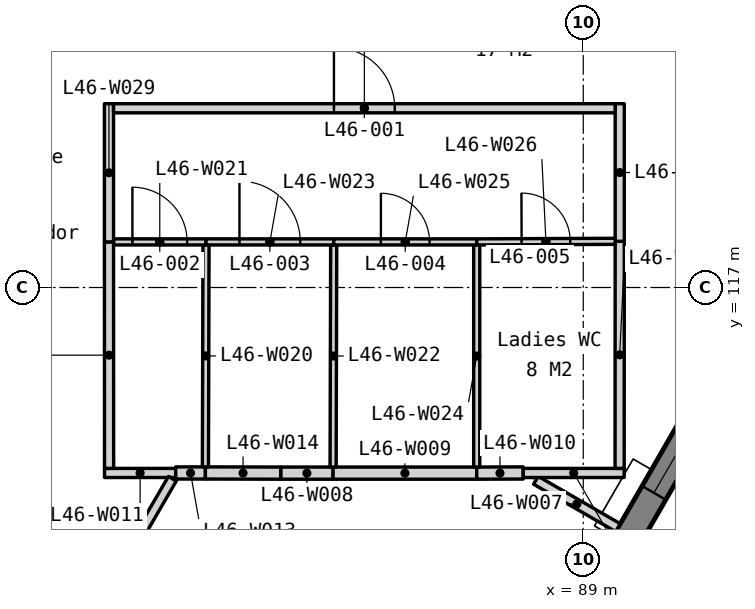
"""IFC4 building model, lengths in metres.
Left out: names, types, materials, properties, quantities, classifications, styles, units other than length and angle.
Written with IfcOpenShell. Run it as: python <this file> out.ifc"""

import sys

from ifc_helpers import new_model, si_unit, direction, frame, frame_2d, origin, place, context, subcontext, project, spatial, polyline, rectangle, outline, extrude, element, fill, save


model = new_model("IFC4")
c1 = context("Model", 3, precision=1e-05, world=origin(), true_north=direction((0.0, 1.0)))
c2 = subcontext(c1, "Body", "Model", "MODEL_VIEW")
j1 = project(units=[si_unit("LENGTHUNIT", "METRE"), si_unit("PLANEANGLEUNIT", "RADIAN")], contexts=[c1])
p1 = place(None, origin())
s1 = spatial("IfcSite", under=j1, at=p1, CompositionType="ELEMENT")
p2 = place(p1, origin())
s2 = spatial("IfcBuilding", under=s1, at=p2, CompositionType="ELEMENT")
p3 = place(p2, frame((0.0, 0.0, 184.1)))
s3 = spatial("IfcBuildingStorey", under=s2, at=p3, CompositionType="ELEMENT", Elevation=184.1)
p4 = place(p3, frame((81.505, 98.627, -0.15), z_axis=(0.0, 0.0, 1.0), x_axis=(0.500002199942, 0.866024133644, 0.0)))
e1 = element("IfcWall", 1, at=p4, inside=s3, PredefinedType="SOLIDWALL", context=c2, shape_type="SweptSolid", body=[
    extrude(outline(polyline([(38.729, 0.0), (38.729, 3.9), (0.0, 3.9), (0.0, 0.0), (38.729, 0.0)])), frame((0.0, 0.225, 0.0), z_axis=(0.0, -1.0, 0.0), x_axis=(1.0, 0.0, 0.0)), (0.0, 0.0, 1.0), 0.45),
])
p5 = place(p4, frame((0.776, 0.0, 0.95)))
e2 = element("IfcOpeningElement", 2, at=p5, cuts=e1, PredefinedType="OPENING", context=c2, shape_type="SweptSolid", body=[
    extrude(rectangle(XDim=1.2, YDim=2.2, at=frame_2d((0.6, 1.1))), frame((0.0, 0.235, 0.0), z_axis=(0.0, -1.0, 0.0), x_axis=(1.0, 0.0, 0.0)), (0.0, 0.0, 1.0), 0.47),
])
p6 = place(p4, frame((7.632, 0.0, 0.95)))
e3 = element("IfcOpeningElement", 3, at=p6, cuts=e1, PredefinedType="OPENING", context=c2, shape_type="SweptSolid", body=[
    extrude(rectangle(XDim=1.8, YDim=2.2, at=frame_2d((0.9, 1.1))), frame((0.0, 0.235, 0.0), z_axis=(0.0, -1.0, 0.0), x_axis=(1.0, 0.0, 0.0)), (0.0, 0.0, 1.0), 0.47),
])
p7 = place(p4, frame((9.932, 0.0, 0.95)))
e4 = element("IfcOpeningElement", 4, at=p7, cuts=e1, PredefinedType="OPENING", context=c2, shape_type="SweptSolid", body=[
    extrude(rectangle(XDim=1.8, YDim=2.2, at=frame_2d((0.9, 1.1))), frame((0.0, 0.235, 0.0), z_axis=(0.0, -1.0, 0.0), x_axis=(1.0, 0.0, 0.0)), (0.0, 0.0, 1.0), 0.47),
])
p8 = place(p4, frame((17.315, 0.0, 0.95)))
e5 = element("IfcOpeningElement", 5, at=p8, cuts=e1, PredefinedType="OPENING", context=c2, shape_type="SweptSolid", body=[
    extrude(rectangle(XDim=1.8, YDim=2.2, at=frame_2d((0.9, 1.1))), frame((0.0, 0.235, 0.0), z_axis=(0.0, -1.0, 0.0), x_axis=(1.0, 0.0, 0.0)), (0.0, 0.0, 1.0), 0.47),
])
p9 = place(p4, frame((19.615, 0.0, 0.95)))
e6 = element("IfcOpeningElement", 6, at=p9, cuts=e1, PredefinedType="OPENING", context=c2, shape_type="SweptSolid", body=[
    extrude(rectangle(XDim=1.8, YDim=2.2, at=frame_2d((0.9, 1.1))), frame((0.0, 0.235, 0.0), z_axis=(0.0, -1.0, 0.0), x_axis=(1.0, 0.0, 0.0)), (0.0, 0.0, 1.0), 0.47),
])
p10 = place(p4, frame((26.997, 0.0, 0.95)))
e7 = element("IfcOpeningElement", 7, at=p10, cuts=e1, PredefinedType="OPENING", context=c2, shape_type="SweptSolid", body=[
    extrude(rectangle(XDim=1.8, YDim=2.2, at=frame_2d((0.9, 1.1))), frame((0.0, 0.235, 0.0), z_axis=(0.0, -1.0, 0.0), x_axis=(1.0, 0.0, 0.0)), (0.0, 0.0, 1.0), 0.47),
])
p11 = place(p4, frame((29.297, 0.0, 0.95)))
e8 = element("IfcOpeningElement", 8, at=p11, cuts=e1, PredefinedType="OPENING", context=c2, shape_type="SweptSolid", body=[
    extrude(rectangle(XDim=1.8, YDim=2.2, at=frame_2d((0.9, 1.1))), frame((0.0, 0.235, 0.0), z_axis=(0.0, -1.0, 0.0), x_axis=(1.0, 0.0, 0.0)), (0.0, 0.0, 1.0), 0.47),
])
p12 = place(p4, frame((36.753, 0.0, 0.95)))
e9 = element("IfcOpeningElement", 9, at=p12, cuts=e1, PredefinedType="OPENING", context=c2, shape_type="SweptSolid", body=[
    extrude(rectangle(XDim=1.2, YDim=2.2, at=frame_2d((0.6, 1.1))), frame((0.0, 0.235, 0.0), z_axis=(0.0, -1.0, 0.0), x_axis=(1.0, 0.0, 0.0)), (0.0, 0.0, 1.0), 0.47),
])
p13 = place(p3, frame((88.221, 113.83, 0.0), z_axis=(0.0, 0.0, 1.0), x_axis=(0.865997745606, -0.500047902311, 0.0)))
e10 = element("IfcWall", 10, at=p13, inside=s3, PredefinedType="PARTITIONING", context=c2, shape_type="SweptSolid", body=[
    extrude(rectangle(XDim=1.558, YDim=0.15, at=frame_2d((0.779, 0.0))), origin(), (0.0, 0.0, 1.0), 3.75),
])
p14 = place(p3, frame((84.024, 113.947, 0.0), z_axis=(0.0, 0.0, 1.0), x_axis=(1.0, 0.0, 0.0)))
e11 = element("IfcWall", 11, at=p14, inside=s3, PredefinedType="PARTITIONING", context=c2, shape_type="SweptSolid", body=[
    extrude(rectangle(XDim=0.862, YDim=0.2, at=frame_2d((0.431, 0.0))), origin(), (0.0, 0.0, 1.0), 3.75),
])
p15 = place(p3, frame((84.886, 113.947, 0.0), z_axis=(0.0, 0.0, 1.0), x_axis=(1.0, 0.0, 0.0)))
e12 = element("IfcWall", 12, at=p15, inside=s3, PredefinedType="PARTITIONING", context=c2, shape_type="SweptSolid", body=[
    extrude(rectangle(XDim=2.362, YDim=0.2, at=frame_2d((1.181, 0.0))), origin(), (0.0, 0.0, 1.0), 3.75),
])
p16 = place(p3, frame((87.248, 113.947, 0.0), z_axis=(0.0, 0.0, 1.0), x_axis=(0.9999926602, 0.003831389503, 0.0)))
e13 = element("IfcWall", 13, at=p16, inside=s3, PredefinedType="PARTITIONING", context=c2, shape_type="SweptSolid", body=[
    extrude(rectangle(XDim=0.765, YDim=0.2, at=frame_2d((0.382, 0.0))), origin(), (0.0, 0.0, 1.0), 3.75),
])
p17 = place(p3, frame((81.127, 113.95, 0.0), z_axis=(0.0, 0.0, 1.0), x_axis=(1.0, 0.0, 0.0)))
e14 = element("IfcWall", 14, at=p17, inside=s3, PredefinedType="PARTITIONING", context=c2, shape_type="SweptSolid", body=[
    extrude(rectangle(XDim=1.17, YDim=0.15, at=frame_2d((0.585, 0.0))), origin(), (0.0, 0.0, 1.0), 3.75),
])
p18 = place(p3, frame((80.352, 110.6, 0.0), z_axis=(0.0, 0.0, 1.0), x_axis=(0.502155861577, 0.864777133534, 0.0)))
e15 = element("IfcWall", 15, at=p18, inside=s3, PredefinedType="PARTITIONING", context=c2, shape_type="SweptSolid", body=[
    extrude(rectangle(XDim=3.764, YDim=0.15, at=frame_2d((1.882, 0.0))), origin(), (0.0, 0.0, 1.0), 3.75),
])
p19 = place(p18, frame((1.382, 0.0, 0.0)))
e16 = element("IfcOpeningElement", 16, at=p19, cuts=e15, PredefinedType="OPENING", context=c2, shape_type="SweptSolid", body=[
    extrude(rectangle(XDim=1.0, YDim=2.1, at=frame_2d((0.5, 1.05))), frame((0.0, 0.085, 0.0), z_axis=(0.0, -1.0, 0.0), x_axis=(1.0, 0.0, 0.0)), (0.0, 0.0, 1.0), 0.17),
])
p20 = place(p3, frame((82.297, 113.95, 0.0), z_axis=(0.0, 0.0, 1.0), x_axis=(1.0, 0.0, 0.0)))
e17 = element("IfcWall", 17, at=p20, inside=s3, PredefinedType="PARTITIONING", context=c2, shape_type="SweptSolid", body=[
    extrude(rectangle(XDim=0.489, YDim=0.2, at=frame_2d((0.244, 0.0))), origin(), (0.0, 0.0, 1.0), 3.75),
])
p21 = place(p3, frame((82.786, 113.95, 0.0), z_axis=(0.0, 0.0, 1.0), x_axis=(0.999997200094, -0.002366390535, 0.0)))
e18 = element("IfcWall", 18, at=p21, inside=s3, PredefinedType="PARTITIONING", context=c2, shape_type="SweptSolid", body=[
    extrude(rectangle(XDim=1.238, YDim=0.2, at=frame_2d((0.619, 0.0))), origin(), (0.0, 0.0, 1.0), 3.75),
])
p22 = place(p3, frame((88.013, 113.95, 0.0), z_axis=(0.0, 0.0, 1.0), x_axis=(1.0, 0.0, 0.0)))
e19 = element("IfcWall", 19, at=p22, inside=s3, PredefinedType="PARTITIONING", context=c2, shape_type="SweptSolid", body=[
    extrude(rectangle(XDim=1.66, YDim=0.15, at=frame_2d((0.83, 0.0))), origin(), (0.0, 0.0, 1.0), 3.75),
])
p23 = place(p3, frame((89.598, 114.025, 0.0), z_axis=(0.0, 0.0, 1.0), x_axis=(0.000588273642, 0.999999826967, 0.0)))
e20 = element("IfcWall", 20, at=p23, inside=s3, PredefinedType="PARTITIONING", context=c2, shape_type="SweptSolid", body=[
    extrude(rectangle(XDim=3.735, YDim=0.15, at=frame_2d((1.868, 0.0))), origin(), (0.0, 0.0, 1.0), 3.75),
])
p24 = place(p3, frame((89.6, 117.76, 0.0), z_axis=(0.0, 0.0, 1.0), x_axis=(0.0, 1.0, 0.0)))
e21 = element("IfcWall", 21, at=p24, inside=s3, PredefinedType="PARTITIONING", context=c2, shape_type="SweptSolid", body=[
    extrude(rectangle(XDim=2.263, YDim=0.15, at=frame_2d((1.131, 0.0))), origin(), (0.0, 0.0, 1.0), 3.75),
])
p25 = place(p3, frame((82.786, 114.05, 0.0), z_axis=(0.0, 0.0, 1.0), x_axis=(0.002608686776, 0.999996597371, 0.0)))
e22 = element("IfcWall", 22, at=p25, inside=s3, PredefinedType="PARTITIONING", context=c2, shape_type="SweptSolid", body=[
    extrude(rectangle(XDim=3.65, YDim=0.1, at=frame_2d((1.825, 0.0))), origin(), (0.0, 0.0, 1.0), 3.75),
])
p26 = place(p3, frame((81.275, 117.75, 0.0), z_axis=(0.0, 0.0, 1.0), x_axis=(1.0, 0.0, 0.0)))
e23 = element("IfcWall", 23, at=p26, inside=s3, PredefinedType="PARTITIONING", context=c2, shape_type="SweptSolid", body=[
    extrude(rectangle(XDim=1.521, YDim=0.1, at=frame_2d((0.76, 0.0))), origin(), (0.0, 0.0, 1.0), 3.75),
])
p27 = place(p26, frame((0.311, 0.0, 0.0)))
e24 = element("IfcOpeningElement", 24, at=p27, cuts=e23, PredefinedType="OPENING", context=c2, shape_type="SweptSolid", body=[
    extrude(rectangle(XDim=0.9, YDim=2.1, at=frame_2d((0.45, 1.05))), frame((0.0, 0.06, 0.0), z_axis=(0.0, -1.0, 0.0), x_axis=(1.0, 0.0, 0.0)), (0.0, 0.0, 1.0), 0.12),
])
p28 = place(p3, frame((84.886, 114.047, 0.0), z_axis=(0.0, 0.0, 1.0), x_axis=(0.00260659454, 0.999996602827, 0.0)))
e25 = element("IfcWall", 25, at=p28, inside=s3, PredefinedType="PARTITIONING", context=c2, shape_type="SweptSolid", body=[
    extrude(rectangle(XDim=3.653, YDim=0.1, at=frame_2d((1.826, 0.0))), origin(), (0.0, 0.0, 1.0), 3.75),
])
p29 = place(p3, frame((82.796, 117.75, 0.0), z_axis=(0.0, 0.0, 1.0), x_axis=(1.0, 0.0, 0.0)))
e26 = element("IfcWall", 26, at=p29, inside=s3, PredefinedType="PARTITIONING", context=c2, shape_type="SweptSolid", body=[
    extrude(rectangle(XDim=2.1, YDim=0.1, at=frame_2d((1.05, 0.0))), origin(), (0.0, 0.0, 1.0), 3.75),
])
p30 = place(p29, frame((0.55, 0.0, 0.0)))
e27 = element("IfcOpeningElement", 27, at=p30, cuts=e26, PredefinedType="OPENING", context=c2, shape_type="SweptSolid", body=[
    extrude(rectangle(XDim=1.0, YDim=2.1, at=frame_2d((0.5, 1.05))), frame((0.0, 0.06, 0.0), z_axis=(0.0, -1.0, 0.0), x_axis=(1.0, 0.0, 0.0)), (0.0, 0.0, 1.0), 0.12),
])
p31 = place(p3, frame((87.248, 114.047, 0.0), z_axis=(0.0, 0.0, 1.0), x_axis=(0.0, 1.0, 0.0)))
e28 = element("IfcWall", 28, at=p31, inside=s3, PredefinedType="PARTITIONING", context=c2, shape_type="SweptSolid", body=[
    extrude(rectangle(XDim=3.653, YDim=0.1, at=frame_2d((1.826, 0.0))), origin(), (0.0, 0.0, 1.0), 3.75),
])
p32 = place(p3, frame((84.896, 117.75, 0.0), z_axis=(0.0, 0.0, 1.0), x_axis=(1.0, 0.0, 0.0)))
e29 = element("IfcWall", 29, at=p32, inside=s3, PredefinedType="PARTITIONING", context=c2, shape_type="SweptSolid", body=[
    extrude(rectangle(XDim=2.352, YDim=0.1, at=frame_2d((1.176, 0.0))), origin(), (0.0, 0.0, 1.0), 3.75),
])
p33 = place(p32, frame((0.776, 0.0, 0.0)))
e30 = element("IfcOpeningElement", 30, at=p33, cuts=e29, PredefinedType="OPENING", context=c2, shape_type="SweptSolid", body=[
    extrude(rectangle(XDim=0.8, YDim=2.1, at=frame_2d((0.4, 1.05))), frame((0.0, 0.06, 0.0), z_axis=(0.0, -1.0, 0.0), x_axis=(1.0, 0.0, 0.0)), (0.0, 0.0, 1.0), 0.12),
])
p34 = place(p3, frame((87.248, 117.75, 0.0), z_axis=(0.0, 0.0, 1.0), x_axis=(0.999990802005, 0.00428904483, 0.0)))
e31 = element("IfcWall", 31, at=p34, inside=s3, PredefinedType="PARTITIONING", context=c2, shape_type="SweptSolid", body=[
    extrude(rectangle(XDim=2.277, YDim=0.1, at=frame_2d((1.138, 0.0))), origin(), (0.0, 0.0, 1.0), 3.75),
])
p35 = place(p34, frame((0.739, 0.0, 0.0)))
e32 = element("IfcOpeningElement", 32, at=p35, cuts=e31, PredefinedType="OPENING", context=c2, shape_type="SweptSolid", body=[
    extrude(rectangle(XDim=0.8, YDim=2.1, at=frame_2d((0.4, 1.05))), frame((0.0, 0.06, 0.0), z_axis=(0.0, -1.0, 0.0), x_axis=(1.0, 0.0, 0.0)), (0.0, 0.0, 1.0), 0.12),
])
p36 = place(p3, frame((81.202, 114.025, 0.0), z_axis=(0.0, 0.0, 1.0), x_axis=(-0.000524315041, 0.999999862547, 0.0)))
e33 = element("IfcWall", 33, at=p36, inside=s3, PredefinedType="PARTITIONING", context=c2, shape_type="SweptSolid", body=[
    extrude(rectangle(XDim=3.725, YDim=0.15, at=frame_2d((1.863, 0.0))), origin(), (0.0, 0.0, 1.0), 3.75),
])
p37 = place(p3, frame((81.2, 117.75, 0.0), z_axis=(0.0, 0.0, 1.0), x_axis=(0.0, 1.0, 0.0)))
e34 = element("IfcWall", 34, at=p37, inside=s3, PredefinedType="PARTITIONING", context=c2, shape_type="SweptSolid", body=[
    extrude(rectangle(XDim=2.273, YDim=0.15, at=frame_2d((1.136, 0.0))), origin(), (0.0, 0.0, 1.0), 3.75),
])
p38 = place(p3, frame((81.275, 119.948, 0.0), z_axis=(0.0, 0.0, 1.0), x_axis=(1.0, 0.0, 0.0)))
e35 = element("IfcWall", 35, at=p38, inside=s3, PredefinedType="PARTITIONING", context=c2, shape_type="SweptSolid", body=[
    extrude(rectangle(XDim=8.25, YDim=0.15, at=frame_2d((4.125, 0.0))), origin(), (0.0, 0.0, 1.0), 3.75),
])
p39 = place(p38, frame((3.625, 0.0, 0.0)))
e36 = element("IfcOpeningElement", 36, at=p39, cuts=e35, PredefinedType="OPENING", context=c2, shape_type="SweptSolid", body=[
    extrude(rectangle(XDim=1.0, YDim=2.1, at=frame_2d((0.5, 1.05))), frame((0.0, 0.085, 0.0), z_axis=(0.0, -1.0, 0.0), x_axis=(1.0, 0.0, 0.0)), (0.0, 0.0, 1.0), 0.17),
])
p40 = place(p8, origin())
e37 = element("IfcWindow", 37, at=p40, inside=s3, PartitioningType="SINGLE_PANEL", PredefinedType="WINDOW", context=c2, shape_type="SweptSolid", body=[
    extrude(rectangle(XDim=1.8, YDim=2.2, at=frame_2d((0.9, 1.1))), frame((0.0, 0.03, 0.0), z_axis=(0.0, -1.0, 0.0), x_axis=(1.0, 0.0, 0.0)), (0.0, 0.0, 1.0), 0.06),
])
fill(e5, e37)
p41 = place(p39, origin())
e38 = element("IfcDoor", 38, at=p41, inside=s3, OperationType="SINGLE_SWING_LEFT", PredefinedType="DOOR", context=c2, shape_type="SweptSolid", body=[
    extrude(rectangle(XDim=1.0, YDim=2.1, at=frame_2d((0.5, 1.05))), frame((0.0, 0.025, 0.0), z_axis=(0.0, -1.0, 0.0), x_axis=(1.0, 0.0, 0.0)), (0.0, 0.0, 1.0), 0.05),
])
fill(e36, e38)
p42 = place(p27, origin())
e39 = element("IfcDoor", 39, at=p42, inside=s3, OperationType="SINGLE_SWING_LEFT", PredefinedType="DOOR", context=c2, shape_type="SweptSolid", body=[
    extrude(rectangle(XDim=0.9, YDim=2.1, at=frame_2d((0.45, 1.05))), frame((0.0, 0.025, 0.0), z_axis=(0.0, -1.0, 0.0), x_axis=(1.0, 0.0, 0.0)), (0.0, 0.0, 1.0), 0.05),
])
fill(e24, e39)
p43 = place(p30, origin())
e40 = element("IfcDoor", 40, at=p43, inside=s3, OperationType="SINGLE_SWING_LEFT", PredefinedType="DOOR", context=c2, shape_type="SweptSolid", body=[
    extrude(rectangle(XDim=1.0, YDim=2.1, at=frame_2d((0.5, 1.05))), frame((0.0, 0.025, 0.0), z_axis=(0.0, -1.0, 0.0), x_axis=(1.0, 0.0, 0.0)), (0.0, 0.0, 1.0), 0.05),
])
fill(e27, e40)
p44 = place(p33, origin())
e41 = element("IfcDoor", 41, at=p44, inside=s3, OperationType="SINGLE_SWING_LEFT", PredefinedType="DOOR", context=c2, shape_type="SweptSolid", body=[
    extrude(rectangle(XDim=0.8, YDim=2.1, at=frame_2d((0.4, 1.05))), frame((0.0, 0.025, 0.0), z_axis=(0.0, -1.0, 0.0), x_axis=(1.0, 0.0, 0.0)), (0.0, 0.0, 1.0), 0.05),
])
fill(e30, e41)
p45 = place(p35, origin())
e42 = element("IfcDoor", 42, at=p45, inside=s3, OperationType="SINGLE_SWING_LEFT", PredefinedType="DOOR", context=c2, shape_type="SweptSolid", body=[
    extrude(rectangle(XDim=0.8, YDim=2.1, at=frame_2d((0.4, 1.05))), frame((0.0, 0.025, 0.0), z_axis=(0.0, -1.0, 0.0), x_axis=(1.0, 0.0, 0.0)), (0.0, 0.0, 1.0), 0.05),
])
fill(e32, e42)
save(model, sys.argv[1])
